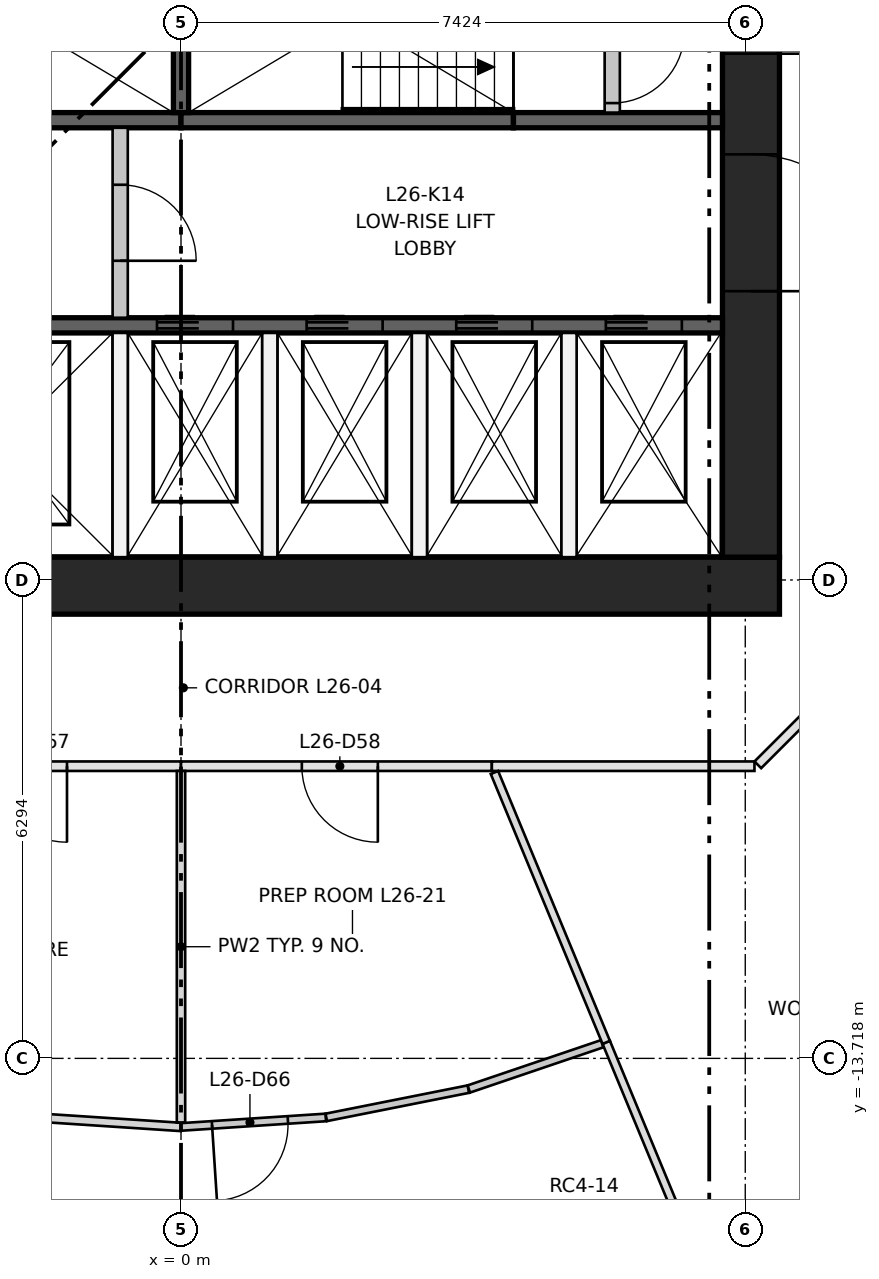
"""IFC4 building model, lengths in metres.
Left out: names, types, materials, properties, quantities, classifications, styles, units other than length and angle.
Written with IfcOpenShell. Run it as: python <this file> out.ifc"""

import sys

from ifc_helpers import new_model, si_unit, direction, frame, frame_2d, origin, place, context, subcontext, project, spatial, rectangle, extrude, element, fill, save


model = new_model("IFC4")
c1 = context("Model", 3, precision=1e-05, world=origin(), true_north=direction((0.0, 1.0)))
c2 = subcontext(c1, "Body", "Model", "MODEL_VIEW")
j1 = project(units=[si_unit("LENGTHUNIT", "METRE"), si_unit("PLANEANGLEUNIT", "RADIAN")], contexts=[c1])
p1 = place(None, origin())
s1 = spatial("IfcSite", under=j1, at=p1, CompositionType="ELEMENT")
p2 = place(p1, origin())
s2 = spatial("IfcBuilding", under=s1, at=p2, CompositionType="ELEMENT")
p3 = place(p2, frame((0.0, 0.0, 101.95)))
s3 = spatial("IfcBuildingStorey", under=s2, at=p3, CompositionType="ELEMENT", Elevation=101.95)
p4 = place(p3, frame((-7.874, -7.499, 0.0), z_axis=(0.0, 0.0, 1.0), x_axis=(1.0, 0.0, 0.0)))
e1 = element("IfcWall", 1, at=p4, inside=s3, PredefinedType="SHEAR", context=c2, shape_type="SweptSolid", body=[
    extrude(rectangle(XDim=15.748, YDim=0.75, at=frame_2d((7.874, 0.0))), origin(), (0.0, 0.0, 1.0), 3.65),
])
p5 = place(p3, frame((7.499, -7.124, 0.0), z_axis=(0.0, 0.0, 1.0), x_axis=(0.0, 1.0, 0.0)))
e2 = element("IfcWall", 2, at=p5, inside=s3, PredefinedType="SHEAR", context=c2, shape_type="SweptSolid", body=[
    extrude(rectangle(XDim=14.248, YDim=0.75, at=frame_2d((7.124, 0.0))), origin(), (0.0, 0.0, 1.0), 3.65),
])
p6 = place(p5, frame((6.624, 0.0, 0.0)))
e3 = element("IfcOpeningElement", 3, at=p6, cuts=e2, PredefinedType="OPENING", context=c2, shape_type="SweptSolid", body=[
    extrude(rectangle(XDim=1.0, YDim=2.1, at=frame_2d((0.5, 1.05))), frame((0.0, 0.385, 0.0), z_axis=(0.0, -1.0, 0.0), x_axis=(1.0, 0.0, 0.0)), (0.0, 0.0, 1.0), 0.77),
])
p7 = place(p5, frame((3.5, 0.0, 0.0)))
e4 = element("IfcOpeningElement", 4, at=p7, cuts=e2, PredefinedType="OPENING", context=c2, shape_type="SweptSolid", body=[
    extrude(rectangle(XDim=1.8, YDim=2.1, at=frame_2d((0.9, 1.05))), frame((0.0, 0.385, 0.0), z_axis=(0.0, -1.0, 0.0), x_axis=(1.0, 0.0, 0.0)), (0.0, 0.0, 1.0), 0.77),
])
p8 = place(p5, frame((8.948, 0.0, 0.0)))
e5 = element("IfcOpeningElement", 5, at=p8, cuts=e2, PredefinedType="OPENING", context=c2, shape_type="SweptSolid", body=[
    extrude(rectangle(XDim=1.8, YDim=2.1, at=frame_2d((0.9, 1.05))), frame((0.0, 0.385, 0.0), z_axis=(0.0, -1.0, 0.0), x_axis=(1.0, 0.0, 0.0)), (0.0, 0.0, 1.0), 0.77),
])
p9 = place(p3, frame((-7.124, -4.074, 0.0), z_axis=(0.0, 0.0, 1.0), x_axis=(1.0, 0.0, 0.0)))
e6 = element("IfcWall", 6, at=p9, inside=s3, PredefinedType="SHEAR", context=c2, shape_type="SweptSolid", body=[
    extrude(rectangle(XDim=14.248, YDim=0.2, at=frame_2d((7.124, 0.0))), origin(), (0.0, 0.0, 1.0), 3.3),
])
p10 = place(p9, frame((1.069, 0.0, 0.0)))
e7 = element("IfcOpeningElement", 7, at=p10, cuts=e6, PredefinedType="OPENING", context=c2, shape_type="SweptSolid", body=[
    extrude(rectangle(XDim=1.1, YDim=2.1, at=frame_2d((0.55, 1.05))), frame((0.0, 0.11, 0.0), z_axis=(0.0, -1.0, 0.0), x_axis=(1.0, 0.0, 0.0)), (0.0, 0.0, 1.0), 0.22),
])
p11 = place(p9, frame((4.206, 0.0, 0.0)))
e8 = element("IfcOpeningElement", 8, at=p11, cuts=e6, PredefinedType="OPENING", context=c2, shape_type="SweptSolid", body=[
    extrude(rectangle(XDim=1.1, YDim=2.1, at=frame_2d((0.55, 1.05))), frame((0.0, 0.11, 0.0), z_axis=(0.0, -1.0, 0.0), x_axis=(1.0, 0.0, 0.0)), (0.0, 0.0, 1.0), 0.22),
])
p12 = place(p9, frame((6.808, 0.0, 0.0)))
e9 = element("IfcOpeningElement", 9, at=p12, cuts=e6, PredefinedType="OPENING", context=c2, shape_type="SweptSolid", body=[
    extrude(rectangle(XDim=1.0, YDim=2.1, at=frame_2d((0.5, 1.05))), frame((0.0, 0.11, 0.0), z_axis=(0.0, -1.0, 0.0), x_axis=(1.0, 0.0, 0.0)), (0.0, 0.0, 1.0), 0.22),
])
p13 = place(p9, frame((8.777, 0.0, 0.0)))
e10 = element("IfcOpeningElement", 10, at=p13, cuts=e6, PredefinedType="OPENING", context=c2, shape_type="SweptSolid", body=[
    extrude(rectangle(XDim=1.0, YDim=2.1, at=frame_2d((0.5, 1.05))), frame((0.0, 0.11, 0.0), z_axis=(0.0, -1.0, 0.0), x_axis=(1.0, 0.0, 0.0)), (0.0, 0.0, 1.0), 0.22),
])
p14 = place(p9, frame((10.745, 0.0, 0.0)))
e11 = element("IfcOpeningElement", 11, at=p14, cuts=e6, PredefinedType="OPENING", context=c2, shape_type="SweptSolid", body=[
    extrude(rectangle(XDim=1.0, YDim=2.1, at=frame_2d((0.5, 1.05))), frame((0.0, 0.11, 0.0), z_axis=(0.0, -1.0, 0.0), x_axis=(1.0, 0.0, 0.0)), (0.0, 0.0, 1.0), 0.22),
])
p15 = place(p9, frame((12.714, 0.0, 0.0)))
e12 = element("IfcOpeningElement", 12, at=p15, cuts=e6, PredefinedType="OPENING", context=c2, shape_type="SweptSolid", body=[
    extrude(rectangle(XDim=1.0, YDim=2.1, at=frame_2d((0.5, 1.05))), frame((0.0, 0.11, 0.0), z_axis=(0.0, -1.0, 0.0), x_axis=(1.0, 0.0, 0.0)), (0.0, 0.0, 1.0), 0.22),
])
for number, where, z_axis, x_axis in (
    (13, (-4.374, -1.375, 0.0), (0.0, 0.0, 1.0), (1.0, 0.0, 0.0)),
    (14, (0.0, -1.375, 0.0), (0.0, 0.0, 1.0), (1.0, 0.0, 0.0)),
):
    element("IfcWall", number, at=place(p3, frame(where, z_axis=z_axis, x_axis=x_axis)), inside=s3, PredefinedType="SHEAR", context=c2, shape_type="SweptSolid", body=[
        extrude(rectangle(XDim=4.374, YDim=0.2, at=frame_2d((2.187, 0.0))), origin(), (0.0, 0.0, 1.0), 3.3),
    ])
p16 = place(p3, frame((4.374, -1.375, 0.0), z_axis=(0.0, 0.0, 1.0), x_axis=(1.0, 0.0, 0.0)))
e15 = element("IfcWall", 15, at=p16, inside=s3, PredefinedType="SHEAR", context=c2, shape_type="SweptSolid", body=[
    extrude(rectangle(XDim=2.75, YDim=0.2, at=frame_2d((1.375, 0.0))), origin(), (0.0, 0.0, 1.0), 3.3),
])
p17 = place(p3, frame((0.0, -1.275, 0.0), z_axis=(0.0, 0.0, 1.0), x_axis=(0.0, 1.0, 0.0)))
e16 = element("IfcWall", 16, at=p17, inside=s3, PredefinedType="SHEAR", context=c2, shape_type="SweptSolid", body=[
    extrude(rectangle(XDim=2.55, YDim=0.2, at=frame_2d((1.275, 0.0))), origin(), (0.0, 0.0, 1.0), 3.3),
])
p18 = place(p3, frame((-0.8, -7.124, 0.0), z_axis=(0.0, 0.0, 1.0), x_axis=(0.0, 1.0, 0.0)))
e17 = element("IfcWall", 17, at=p18, inside=s3, PredefinedType="PARTITIONING", context=c2, shape_type="SweptSolid", body=[
    extrude(rectangle(XDim=2.95, YDim=0.2, at=frame_2d((1.475, 0.0))), origin(), (0.0, 0.0, 1.0), 3.3),
])
p19 = place(p3, frame((-0.8, -3.974, 0.0), z_axis=(0.0, 0.0, 1.0), x_axis=(0.0, 1.0, 0.0)))
e18 = element("IfcWall", 18, at=p19, inside=s3, PredefinedType="PARTITIONING", context=c2, shape_type="SweptSolid", body=[
    extrude(rectangle(XDim=2.499, YDim=0.2, at=frame_2d((1.25, 0.0))), origin(), (0.0, 0.0, 1.0), 3.3),
])
p20 = place(p19, frame((0.75, 0.0, 0.0)))
e19 = element("IfcOpeningElement", 19, at=p20, cuts=e18, PredefinedType="OPENING", context=c2, shape_type="SweptSolid", body=[
    extrude(rectangle(XDim=1.0, YDim=2.1, at=frame_2d((0.5, 1.05))), frame((0.0, 0.11, 0.0), z_axis=(0.0, -1.0, 0.0), x_axis=(1.0, 0.0, 0.0)), (0.0, 0.0, 1.0), 0.22),
])
for number, where, z_axis, x_axis in (
    (20, (1.168, -7.124, 0.0), (0.0, 0.0, 1.0), (0.0, 1.0, 0.0)),
    (21, (3.137, -7.124, 0.0), (0.0, 0.0, 1.0), (0.0, 1.0, 0.0)),
    (22, (5.105, -7.124, 0.0), (0.0, 0.0, 1.0), (0.0, 1.0, 0.0)),
):
    element("IfcWall", number, at=place(p3, frame(where, z_axis=z_axis, x_axis=x_axis)), inside=s3, PredefinedType="PARTITIONING", context=c2, shape_type="SweptSolid", body=[
        extrude(rectangle(XDim=2.95, YDim=0.2, at=frame_2d((1.475, 0.0))), origin(), (0.0, 0.0, 1.0), 3.3),
    ])
p21 = place(p3, frame((5.674, -1.275, 0.0), z_axis=(0.0, 0.0, 1.0), x_axis=(0.0, 1.0, 0.0)))
e23 = element("IfcWall", 23, at=p21, inside=s3, PredefinedType="PARTITIONING", context=c2, shape_type="SweptSolid", body=[
    extrude(rectangle(XDim=2.55, YDim=0.2, at=frame_2d((1.275, 0.0))), origin(), (0.0, 0.0, 1.0), 3.3),
])
p22 = place(p21, frame((0.125, 0.0, 0.0)))
e24 = element("IfcOpeningElement", 24, at=p22, cuts=e23, PredefinedType="OPENING", context=c2, shape_type="SweptSolid", body=[
    extrude(rectangle(XDim=0.95, YDim=2.1, at=frame_2d((0.475, 1.05))), frame((0.0, 0.11, 0.0), z_axis=(0.0, -1.0, 0.0), x_axis=(1.0, 0.0, 0.0)), (0.0, 0.0, 1.0), 0.22),
])
p23 = place(p21, frame((1.475, 0.0, 0.0)))
e25 = element("IfcOpeningElement", 25, at=p23, cuts=e23, PredefinedType="OPENING", context=c2, shape_type="SweptSolid", body=[
    extrude(rectangle(XDim=0.95, YDim=2.1, at=frame_2d((0.475, 1.05))), frame((0.0, 0.11, 0.0), z_axis=(0.0, -1.0, 0.0), x_axis=(1.0, 0.0, 0.0)), (0.0, 0.0, 1.0), 0.22),
])
p24 = place(p3, frame((0.0, -9.874, 0.0), z_axis=(0.0, 0.0, 1.0), x_axis=(-1.0, 0.0, 0.0)))
e26 = element("IfcWall", 26, at=p24, inside=s3, PredefinedType="PARTITIONING", context=c2, shape_type="SweptSolid", body=[
    extrude(rectangle(XDim=4.09, YDim=0.125, at=frame_2d((2.045, 0.0))), origin(), (0.0, 0.0, 1.0), 3.3),
])
p25 = place(p24, frame((1.5, 0.0, 0.0)))
e27 = element("IfcOpeningElement", 27, at=p25, cuts=e26, PredefinedType="OPENING", context=c2, shape_type="SweptSolid", body=[
    extrude(rectangle(XDim=1.0, YDim=2.1, at=frame_2d((0.5, 1.05))), frame((0.0, 0.073, 0.0), z_axis=(0.0, -1.0, 0.0), x_axis=(1.0, 0.0, 0.0)), (0.0, 0.0, 1.0), 0.145),
])
p26 = place(p3, frame((4.09, -9.874, 0.0), z_axis=(0.0, 0.0, 1.0), x_axis=(-1.0, 0.0, 0.0)))
e28 = element("IfcWall", 28, at=p26, inside=s3, PredefinedType="PARTITIONING", context=c2, shape_type="SweptSolid", body=[
    extrude(rectangle(XDim=4.09, YDim=0.125, at=frame_2d((2.045, 0.0))), origin(), (0.0, 0.0, 1.0), 3.3),
])
p27 = place(p26, frame((1.5, 0.0, 0.0)))
e29 = element("IfcOpeningElement", 29, at=p27, cuts=e28, PredefinedType="OPENING", context=c2, shape_type="SweptSolid", body=[
    extrude(rectangle(XDim=1.0, YDim=2.1, at=frame_2d((0.5, 1.05))), frame((0.0, 0.073, 0.0), z_axis=(0.0, -1.0, 0.0), x_axis=(1.0, 0.0, 0.0)), (0.0, 0.0, 1.0), 0.145),
])
p28 = place(p3, frame((7.545, -9.874, 0.0), z_axis=(0.0, 0.0, 1.0), x_axis=(-1.0, 0.0, 0.0)))
e30 = element("IfcWall", 30, at=p28, inside=s3, PredefinedType="PARTITIONING", context=c2, shape_type="SweptSolid", body=[
    extrude(rectangle(XDim=3.455, YDim=0.125, at=frame_2d((1.728, 0.0))), origin(), (0.0, 0.0, 1.0), 3.3),
])
p29 = place(p3, frame((8.722, -8.722, 0.0), z_axis=(0.0, 0.0, 1.0), x_axis=(-0.707030604857, -0.70718294931, 0.0)))
e31 = element("IfcWall", 31, at=p29, inside=s3, PredefinedType="PARTITIONING", context=c2, shape_type="SweptSolid", body=[
    extrude(rectangle(XDim=1.603, YDim=0.125, at=frame_2d((0.801, 0.0))), origin(), (0.0, 0.0, 1.0), 3.3),
])
p30 = place(p3, frame((0.0, -14.62, 0.0), z_axis=(0.0, 0.0, 1.0), x_axis=(-0.997853662235, 0.065483347227, 0.0)))
e32 = element("IfcWall", 32, at=p30, inside=s3, PredefinedType="PARTITIONING", context=c2, shape_type="SweptSolid", body=[
    extrude(rectangle(XDim=1.909, YDim=0.11, at=frame_2d((0.955, 0.0))), origin(), (0.0, 0.0, 1.0), 3.3),
])
p31 = place(p3, frame((0.0, -9.937, 0.0), z_axis=(0.0, 0.0, 1.0), x_axis=(0.0, -1.0, 0.0)))
e33 = element("IfcWall", 33, at=p31, inside=s3, PredefinedType="PARTITIONING", context=c2, shape_type="SweptSolid", body=[
    extrude(rectangle(XDim=4.625, YDim=0.11, at=frame_2d((2.312, 0.0))), origin(), (0.0, 0.0, 1.0), 3.3),
])
p32 = place(p3, frame((1.905, -14.495, 0.0), z_axis=(0.0, 0.0, 1.0), x_axis=(-0.997854210562, -0.065474991133, 0.0)))
e34 = element("IfcWall", 34, at=p32, inside=s3, PredefinedType="PARTITIONING", context=c2, shape_type="SweptSolid", body=[
    extrude(rectangle(XDim=1.909, YDim=0.1, at=frame_2d((0.955, 0.0))), origin(), (0.0, 0.0, 1.0), 3.3),
])
p33 = place(p32, frame((0.5, 0.0, 0.0)))
e35 = element("IfcOpeningElement", 35, at=p33, cuts=e34, PredefinedType="OPENING", context=c2, shape_type="SweptSolid", body=[
    extrude(rectangle(XDim=1.0, YDim=2.1, at=frame_2d((0.5, 1.05))), frame((0.0, 0.06, 0.0), z_axis=(0.0, -1.0, 0.0), x_axis=(1.0, 0.0, 0.0)), (0.0, 0.0, 1.0), 0.12),
])
p34 = place(p3, frame((1.912, -14.494, 0.0), z_axis=(0.0, 0.0, 1.0), x_axis=(0.980757648215, 0.195229187027, 0.0)))
e36 = element("IfcWall", 36, at=p34, inside=s3, PredefinedType="PARTITIONING", context=c2, shape_type="SweptSolid", body=[
    extrude(rectangle(XDim=1.906, YDim=0.1, at=frame_2d((0.953, 0.0))), origin(), (0.0, 0.0, 1.0), 3.3),
])
p35 = place(p3, frame((3.787, -14.121, 0.0), z_axis=(0.0, 0.0, 1.0), x_axis=(0.946970110486, 0.321321661029, 0.0)))
e37 = element("IfcWall", 37, at=p35, inside=s3, PredefinedType="PARTITIONING", context=c2, shape_type="SweptSolid", body=[
    extrude(rectangle(XDim=1.853, YDim=0.1, at=frame_2d((0.927, 0.0))), origin(), (0.0, 0.0, 1.0), 3.3),
])
p36 = place(p3, frame((5.595, -13.507, 0.0), z_axis=(0.0, 0.0, 1.0), x_axis=(0.382681133009, -0.923880484932, 0.0)))
e38 = element("IfcWall", 38, at=p36, inside=s3, PredefinedType="PARTITIONING", context=c2, shape_type="SweptSolid", body=[
    extrude(rectangle(XDim=3.47, YDim=0.105, at=frame_2d((1.735, 0.0))), origin(), (0.0, 0.0, 1.0), 3.3),
])
p37 = place(p3, frame((4.124, -9.957, 0.0), z_axis=(0.0, 0.0, 1.0), x_axis=(0.382688429768, -0.923877462503, 0.0)))
e39 = element("IfcWall", 39, at=p37, inside=s3, PredefinedType="PARTITIONING", context=c2, shape_type="SweptSolid", body=[
    extrude(rectangle(XDim=3.843, YDim=0.105, at=frame_2d((1.921, 0.0))), origin(), (0.0, 0.0, 1.0), 3.3),
])
p38 = place(p12, origin())
e40 = element("IfcDoor", 40, at=p38, inside=s3, OperationType="DOUBLE_DOOR_SLIDING", PredefinedType="DOOR", context=c2, shape_type="SweptSolid", body=[
    extrude(rectangle(XDim=1.0, YDim=2.1, at=frame_2d((0.5, 1.05))), frame((0.0, 0.025, 0.0), z_axis=(0.0, -1.0, 0.0), x_axis=(1.0, 0.0, 0.0)), (0.0, 0.0, 1.0), 0.05),
])
fill(e9, e40)
p39 = place(p13, origin())
e41 = element("IfcDoor", 41, at=p39, inside=s3, OperationType="DOUBLE_DOOR_SLIDING", PredefinedType="DOOR", context=c2, shape_type="SweptSolid", body=[
    extrude(rectangle(XDim=1.0, YDim=2.1, at=frame_2d((0.5, 1.05))), frame((0.0, 0.025, 0.0), z_axis=(0.0, -1.0, 0.0), x_axis=(1.0, 0.0, 0.0)), (0.0, 0.0, 1.0), 0.05),
])
fill(e10, e41)
p40 = place(p14, origin())
e42 = element("IfcDoor", 42, at=p40, inside=s3, OperationType="DOUBLE_DOOR_SLIDING", PredefinedType="DOOR", context=c2, shape_type="SweptSolid", body=[
    extrude(rectangle(XDim=1.0, YDim=2.1, at=frame_2d((0.5, 1.05))), frame((0.0, 0.025, 0.0), z_axis=(0.0, -1.0, 0.0), x_axis=(1.0, 0.0, 0.0)), (0.0, 0.0, 1.0), 0.05),
])
fill(e11, e42)
p41 = place(p15, origin())
e43 = element("IfcDoor", 43, at=p41, inside=s3, OperationType="DOUBLE_DOOR_SLIDING", PredefinedType="DOOR", context=c2, shape_type="SweptSolid", body=[
    extrude(rectangle(XDim=1.0, YDim=2.1, at=frame_2d((0.5, 1.05))), frame((0.0, 0.025, 0.0), z_axis=(0.0, -1.0, 0.0), x_axis=(1.0, 0.0, 0.0)), (0.0, 0.0, 1.0), 0.05),
])
fill(e12, e43)
p42 = place(p22, frame((0.95, 0.0, 0.0), z_axis=(0.0, 0.0, 1.0), x_axis=(-1.0, 0.0, 0.0)))
e44 = element("IfcDoor", 44, at=p42, inside=s3, OperationType="SINGLE_SWING_RIGHT", PredefinedType="DOOR", context=c2, shape_type="SweptSolid", body=[
    extrude(rectangle(XDim=0.95, YDim=2.1, at=frame_2d((0.475, 1.05))), frame((0.0, 0.025, 0.0), z_axis=(0.0, -1.0, 0.0), x_axis=(1.0, 0.0, 0.0)), (0.0, 0.0, 1.0), 0.05),
])
fill(e24, e44)
p43 = place(p20, frame((1.0, 0.0, 0.0), z_axis=(0.0, 0.0, 1.0), x_axis=(-1.0, 0.0, 0.0)))
e45 = element("IfcDoor", 45, at=p43, inside=s3, OperationType="SINGLE_SWING_LEFT", PredefinedType="DOOR", context=c2, shape_type="SweptSolid", body=[
    extrude(rectangle(XDim=1.0, YDim=2.1, at=frame_2d((0.5, 1.05))), frame((0.0, 0.025, 0.0), z_axis=(0.0, -1.0, 0.0), x_axis=(1.0, 0.0, 0.0)), (0.0, 0.0, 1.0), 0.05),
])
fill(e19, e45)
p44 = place(p6, frame((1.0, 0.0, 0.0), z_axis=(0.0, 0.0, 1.0), x_axis=(-1.0, 0.0, 0.0)))
e46 = element("IfcDoor", 46, at=p44, inside=s3, OperationType="SINGLE_SWING_LEFT", PredefinedType="DOOR", context=c2, shape_type="SweptSolid", body=[
    extrude(rectangle(XDim=1.0, YDim=2.1, at=frame_2d((0.5, 1.05))), frame((0.0, 0.375, 0.0), z_axis=(0.0, -1.0, 0.0), x_axis=(1.0, 0.0, 0.0)), (0.0, 0.0, 1.0), 0.05),
])
fill(e3, e46)
p45 = place(p7, frame((1.8, 0.0, 0.0), z_axis=(0.0, 0.0, 1.0), x_axis=(-1.0, 0.0, 0.0)))
e47 = element("IfcDoor", 47, at=p45, inside=s3, OperationType="DOUBLE_DOOR_SINGLE_SWING", PredefinedType="DOOR", context=c2, shape_type="SweptSolid", body=[
    extrude(rectangle(XDim=1.8, YDim=2.1, at=frame_2d((0.9, 1.05))), frame((0.0, 0.025, 0.0), z_axis=(0.0, -1.0, 0.0), x_axis=(1.0, 0.0, 0.0)), (0.0, 0.0, 1.0), 0.05),
])
fill(e4, e47)
p46 = place(p25, origin())
e48 = element("IfcDoor", 48, at=p46, inside=s3, OperationType="SINGLE_SWING_LEFT", PredefinedType="DOOR", context=c2, shape_type="SweptSolid", body=[
    extrude(rectangle(XDim=1.0, YDim=2.1, at=frame_2d((0.5, 1.05))), frame((0.0, 0.025, 0.0), z_axis=(0.0, -1.0, 0.0), x_axis=(1.0, 0.0, 0.0)), (0.0, 0.0, 1.0), 0.05),
])
fill(e27, e48)
p47 = place(p27, origin())
e49 = element("IfcDoor", 49, at=p47, inside=s3, OperationType="SINGLE_SWING_LEFT", PredefinedType="DOOR", context=c2, shape_type="SweptSolid", body=[
    extrude(rectangle(XDim=1.0, YDim=2.1, at=frame_2d((0.5, 1.05))), frame((0.0, 0.025, 0.0), z_axis=(0.0, -1.0, 0.0), x_axis=(1.0, 0.0, 0.0)), (0.0, 0.0, 1.0), 0.05),
])
fill(e29, e49)
p48 = place(p33, origin())
e50 = element("IfcDoor", 50, at=p48, inside=s3, OperationType="SINGLE_SWING_RIGHT", PredefinedType="DOOR", context=c2, shape_type="SweptSolid", body=[
    extrude(rectangle(XDim=1.0, YDim=2.1, at=frame_2d((0.5, 1.05))), frame((0.0, 0.025, 0.0), z_axis=(0.0, -1.0, 0.0), x_axis=(1.0, 0.0, 0.0)), (0.0, 0.0, 1.0), 0.05),
])
fill(e35, e50)
save(model, sys.argv[1])
